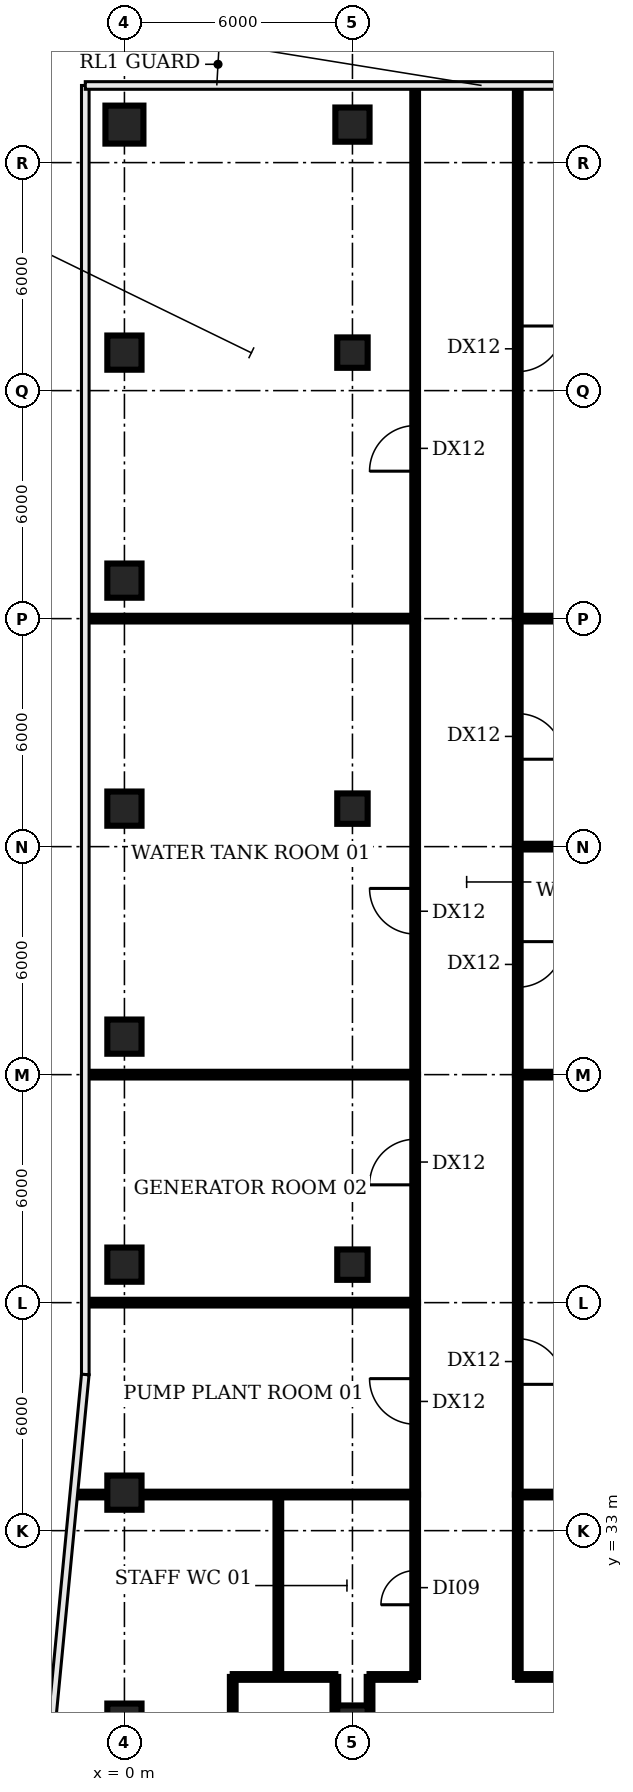
"""IFC4 building model, lengths in metres.
Left out: names, types, materials, properties, quantities, classifications, styles, units other than length and angle.
Written with IfcOpenShell. Run it as: python <this file> out.ifc"""

import sys

from ifc_helpers import new_model, si_unit, direction, frame, frame_2d, origin, origin_2d, place, context, subcontext, project, spatial, rectangle, circle, extrude, element, fill, save


model = new_model("IFC4")
c1 = context("Model", 3, precision=1e-05, world=origin(), true_north=direction((0.0, 1.0)))
c2 = subcontext(c1, "Body", "Model", "MODEL_VIEW")
j1 = project(units=[si_unit("LENGTHUNIT", "METRE"), si_unit("PLANEANGLEUNIT", "RADIAN")], contexts=[c1])
p1 = place(None, origin())
s1 = spatial("IfcSite", under=j1, at=p1, CompositionType="ELEMENT")
p2 = place(p1, origin())
s2 = spatial("IfcBuilding", under=s1, at=p2, CompositionType="ELEMENT")
p3 = place(p2, frame((0.0, 0.0, 251.6)))
s3 = spatial("IfcBuildingStorey", under=s2, at=p3, CompositionType="ELEMENT", Elevation=251.6)
for number, where, z_axis, x_axis in (
    (1, (0.0, 28.0, 0.0), (0.0, 0.0, 1.0), (1.0, 0.0, 0.0)),
    (2, (0.0, 34.0, 0.0), (0.0, 0.0, 1.0), (1.0, 0.0, 0.0)),
    (3, (0.0, 40.0, 0.0), (0.0, 0.0, 1.0), (1.0, 0.0, 0.0)),
    (4, (0.0, 46.0, 0.0), (0.0, 0.0, 1.0), (1.0, 0.0, 0.0)),
    (5, (0.0, 52.0, 0.0), (0.0, 0.0, 1.0), (1.0, 0.0, 0.0)),
    (6, (0.0, 58.0, 0.0), (0.0, 0.0, 1.0), (1.0, 0.0, 0.0)),
    (7, (0.0, 64.0, 0.0), (0.0, 0.0, 1.0), (1.0, 0.0, 0.0)),
):
    element("IfcColumn", number, at=place(p3, frame(where, z_axis=z_axis, x_axis=x_axis)), inside=s3, PredefinedType="COLUMN", context=c2, shape_type="SweptSolid", body=[
        extrude(rectangle(XDim=0.9, YDim=0.9, at=origin_2d()), origin(), (0.0, 0.0, 1.0), 3.2),
    ])
p4 = place(p3, frame((0.0, 70.0, 0.0), z_axis=(0.0, 0.0, 1.0), x_axis=(1.0, 0.0, 0.0)))
e8 = element("IfcColumn", 8, at=p4, inside=s3, PredefinedType="COLUMN", context=c2, shape_type="SweptSolid", body=[
    extrude(circle(Radius=0.5, at=origin_2d()), origin(), (0.0, 0.0, 1.0), 3.2),
])
for number, where, z_axis, x_axis in (
    (9, (6.0, 28.0, 0.0), (0.0, 0.0, 1.0), (1.0, 0.0, 0.0)),
    (10, (6.0, 40.0, 0.0), (0.0, 0.0, 1.0), (1.0, 0.0, 0.0)),
    (11, (6.0, 52.0, 0.0), (0.0, 0.0, 1.0), (1.0, 0.0, 0.0)),
    (12, (6.0, 64.0, 0.0), (0.0, 0.0, 1.0), (1.0, 0.0, 0.0)),
):
    element("IfcColumn", number, at=place(p3, frame(where, z_axis=z_axis, x_axis=x_axis)), inside=s3, PredefinedType="COLUMN", context=c2, shape_type="SweptSolid", body=[
        extrude(rectangle(XDim=0.8, YDim=0.8, at=origin_2d()), origin(), (0.0, 0.0, 1.0), 3.2),
    ])
p5 = place(p3, frame((6.0, 70.0, 0.0), z_axis=(0.0, 0.0, 1.0), x_axis=(1.0, 0.0, 0.0)))
e13 = element("IfcColumn", 13, at=p5, inside=s3, PredefinedType="COLUMN", context=c2, shape_type="SweptSolid", body=[
    extrude(rectangle(XDim=0.9, YDim=0.9, at=origin_2d()), origin(), (0.0, 0.0, 1.0), 3.2),
])
p6 = place(p3, frame((-1.28, 33.95, 0.0), z_axis=(0.0, 0.0, 1.0), x_axis=(1.0, 0.0, 0.0)))
e14 = element("IfcWall", 14, at=p6, inside=s3, PredefinedType="PARTITIONING", context=c2, shape_type="SweptSolid", body=[
    extrude(rectangle(XDim=8.93, YDim=0.15, at=frame_2d((4.465, 0.0))), origin(), (0.0, 0.0, 1.0), 2.83),
])
for number, where, z_axis, x_axis in (
    (15, (-0.98, 39.0, 0.0), (0.0, 0.0, 1.0), (1.0, 0.0, 0.0)),
    (16, (-0.98, 45.0, 0.0), (0.0, 0.0, 1.0), (1.0, 0.0, 0.0)),
    (17, (-0.98, 57.0, 0.0), (0.0, 0.0, 1.0), (1.0, 0.0, 0.0)),
):
    element("IfcWall", number, at=place(p3, frame(where, z_axis=z_axis, x_axis=x_axis)), inside=s3, PredefinedType="PARTITIONING", context=c2, shape_type="SweptSolid", body=[
        extrude(rectangle(XDim=8.63, YDim=0.15, at=frame_2d((4.315, 0.0))), origin(), (0.0, 0.0, 1.0), 2.83),
    ])
p7 = place(p3, frame((2.85, 27.95, 0.0), z_axis=(0.0, 0.0, 1.0), x_axis=(0.0, 1.0, 0.0)))
e18 = element("IfcWall", 18, at=p7, inside=s3, PredefinedType="PARTITIONING", context=c2, shape_type="SweptSolid", body=[
    extrude(rectangle(XDim=1.2, YDim=0.15, at=frame_2d((0.6, 0.0))), origin(), (0.0, 0.0, 1.0), 2.83),
])
p8 = place(p3, frame((2.85, 29.15, 0.0), z_axis=(0.0, 0.0, 1.0), x_axis=(1.0, 0.0, 0.0)))
e19 = element("IfcWall", 19, at=p8, inside=s3, PredefinedType="PARTITIONING", context=c2, shape_type="SweptSolid", body=[
    extrude(rectangle(XDim=2.7, YDim=0.15, at=frame_2d((1.35, 0.0))), origin(), (0.0, 0.0, 1.0), 2.83),
])
p9 = place(p3, frame((4.05, 29.15, 0.0), z_axis=(0.0, 0.0, 1.0), x_axis=(0.0, 1.0, 0.0)))
e20 = element("IfcWall", 20, at=p9, inside=s3, PredefinedType="PARTITIONING", context=c2, shape_type="SweptSolid", body=[
    extrude(rectangle(XDim=4.8, YDim=0.15, at=frame_2d((2.4, 0.0))), origin(), (0.0, 0.0, 1.0), 2.83),
])
for number, where, z_axis, x_axis in (
    (21, (5.55, 28.0, 0.0), (0.0, 0.0, 1.0), (0.0, 1.0, 0.0)),
    (22, (6.45, 28.0, 0.0), (0.0, 0.0, 1.0), (0.0, 1.0, 0.0)),
):
    element("IfcWall", number, at=place(p3, frame(where, z_axis=z_axis, x_axis=x_axis)), inside=s3, PredefinedType="PARTITIONING", context=c2, shape_type="SweptSolid", body=[
        extrude(rectangle(XDim=1.15, YDim=0.15, at=frame_2d((0.575, 0.0))), origin(), (0.0, 0.0, 1.0), 2.83),
    ])
p10 = place(p3, frame((6.45, 29.15, 0.0), z_axis=(0.0, 0.0, 1.0), x_axis=(1.0, 0.0, 0.0)))
e23 = element("IfcWall", 23, at=p10, inside=s3, PredefinedType="PARTITIONING", context=c2, shape_type="SweptSolid", body=[
    extrude(rectangle(XDim=1.2, YDim=0.15, at=frame_2d((0.6, 0.0))), origin(), (0.0, 0.0, 1.0), 2.83),
])
p11 = place(p3, frame((7.65, 29.15, 0.0), z_axis=(0.0, 0.0, 1.0), x_axis=(0.0, 1.0, 0.0)))
e24 = element("IfcWall", 24, at=p11, inside=s3, PredefinedType="PARTITIONING", context=c2, shape_type="SweptSolid", body=[
    extrude(rectangle(XDim=4.8, YDim=0.15, at=frame_2d((2.4, 0.0))), origin(), (0.0, 0.0, 1.0), 2.83),
])
p12 = place(p11, frame((1.9, 0.0, 0.0)))
e25 = element("IfcOpeningElement", 25, at=p12, cuts=e24, PredefinedType="OPENING", context=c2, shape_type="SweptSolid", body=[
    extrude(rectangle(XDim=0.9, YDim=2.1, at=frame_2d((0.45, 1.05))), frame((0.0, 0.085, 0.0), z_axis=(0.0, -1.0, 0.0), x_axis=(1.0, 0.0, 0.0)), (0.0, 0.0, 1.0), 0.17),
])
p13 = place(p3, frame((7.65, 33.95, 0.0), z_axis=(0.0, 0.0, 1.0), x_axis=(0.0, 1.0, 0.0)))
e26 = element("IfcWall", 26, at=p13, inside=s3, PredefinedType="PARTITIONING", context=c2, shape_type="SweptSolid", body=[
    extrude(rectangle(XDim=5.05, YDim=0.15, at=frame_2d((2.525, 0.0))), origin(), (0.0, 0.0, 1.0), 2.83),
])
p14 = place(p13, frame((1.85, 0.0, 0.0)))
e27 = element("IfcOpeningElement", 27, at=p14, cuts=e26, PredefinedType="OPENING", context=c2, shape_type="SweptSolid", body=[
    extrude(rectangle(XDim=1.2, YDim=2.1, at=frame_2d((0.6, 1.05))), frame((0.0, 0.085, 0.0), z_axis=(0.0, -1.0, 0.0), x_axis=(1.0, 0.0, 0.0)), (0.0, 0.0, 1.0), 0.17),
])
p15 = place(p3, frame((7.65, 39.0, 0.0), z_axis=(0.0, 0.0, 1.0), x_axis=(0.0, 1.0, 0.0)))
e28 = element("IfcWall", 28, at=p15, inside=s3, PredefinedType="PARTITIONING", context=c2, shape_type="SweptSolid", body=[
    extrude(rectangle(XDim=6.0, YDim=0.15, at=frame_2d((3.0, 0.0))), origin(), (0.0, 0.0, 1.0), 2.83),
])
p16 = place(p15, frame((3.1, 0.0, 0.0)))
e29 = element("IfcOpeningElement", 29, at=p16, cuts=e28, PredefinedType="OPENING", context=c2, shape_type="SweptSolid", body=[
    extrude(rectangle(XDim=1.2, YDim=2.1, at=frame_2d((0.6, 1.05))), frame((0.0, 0.085, 0.0), z_axis=(0.0, -1.0, 0.0), x_axis=(1.0, 0.0, 0.0)), (0.0, 0.0, 1.0), 0.17),
])
p17 = place(p3, frame((7.65, 45.0, 0.0), z_axis=(0.0, 0.0, 1.0), x_axis=(0.0, 1.0, 0.0)))
e30 = element("IfcWall", 30, at=p17, inside=s3, PredefinedType="PARTITIONING", context=c2, shape_type="SweptSolid", body=[
    extrude(rectangle(XDim=12.0, YDim=0.15, at=frame_2d((6.0, 0.0))), origin(), (0.0, 0.0, 1.0), 2.83),
])
p18 = place(p17, frame((3.7, 0.0, 0.0)))
e31 = element("IfcOpeningElement", 31, at=p18, cuts=e30, PredefinedType="OPENING", context=c2, shape_type="SweptSolid", body=[
    extrude(rectangle(XDim=1.2, YDim=2.1, at=frame_2d((0.6, 1.05))), frame((0.0, 0.085, 0.0), z_axis=(0.0, -1.0, 0.0), x_axis=(1.0, 0.0, 0.0)), (0.0, 0.0, 1.0), 0.17),
])
p19 = place(p3, frame((7.65, 57.0, 0.0), z_axis=(0.0, 0.0, 1.0), x_axis=(0.0, 1.0, 0.0)))
e32 = element("IfcWall", 32, at=p19, inside=s3, PredefinedType="PARTITIONING", context=c2, shape_type="SweptSolid", body=[
    extrude(rectangle(XDim=13.98, YDim=0.15, at=frame_2d((6.99, 0.0))), origin(), (0.0, 0.0, 1.0), 2.83),
])
p20 = place(p19, frame((3.88, 0.0, 0.0)))
e33 = element("IfcOpeningElement", 33, at=p20, cuts=e32, PredefinedType="OPENING", context=c2, shape_type="SweptSolid", body=[
    extrude(rectangle(XDim=1.2, YDim=2.1, at=frame_2d((0.6, 1.05))), frame((0.0, 0.085, 0.0), z_axis=(0.0, -1.0, 0.0), x_axis=(1.0, 0.0, 0.0)), (0.0, 0.0, 1.0), 0.17),
])
p21 = place(p3, frame((10.35, 29.15, 0.0), z_axis=(0.0, 0.0, 1.0), x_axis=(0.0, 1.0, 0.0)))
e34 = element("IfcWall", 34, at=p21, inside=s3, PredefinedType="PARTITIONING", context=c2, shape_type="SweptSolid", body=[
    extrude(rectangle(XDim=4.8, YDim=0.15, at=frame_2d((2.4, 0.0))), origin(), (0.0, 0.0, 1.0), 2.83),
])
p22 = place(p3, frame((10.35, 29.15, 0.0), z_axis=(0.0, 0.0, 1.0), x_axis=(1.0, 0.0, 0.0)))
e35 = element("IfcWall", 35, at=p22, inside=s3, PredefinedType="PARTITIONING", context=c2, shape_type="SweptSolid", body=[
    extrude(rectangle(XDim=1.25, YDim=0.15, at=frame_2d((0.625, 0.0))), origin(), (0.0, 0.0, 1.0), 2.83),
])
p23 = place(p3, frame((10.35, 33.95, 0.0), z_axis=(0.0, 0.0, 1.0), x_axis=(1.0, 0.0, 0.0)))
e36 = element("IfcWall", 36, at=p23, inside=s3, PredefinedType="PARTITIONING", context=c2, shape_type="SweptSolid", body=[
    extrude(rectangle(XDim=14.63, YDim=0.15, at=frame_2d((7.315, 0.0))), origin(), (0.0, 0.0, 1.0), 2.83),
])
p24 = place(p3, frame((10.35, 45.0, 0.0), z_axis=(0.0, 0.0, 1.0), x_axis=(0.0, -1.0, 0.0)))
e37 = element("IfcWall", 37, at=p24, inside=s3, PredefinedType="PARTITIONING", context=c2, shape_type="SweptSolid", body=[
    extrude(rectangle(XDim=11.05, YDim=0.15, at=frame_2d((5.525, 0.0))), origin(), (0.0, 0.0, 1.0), 2.83),
])
p25 = place(p24, frame((6.95, 0.0, 0.0)))
e38 = element("IfcOpeningElement", 38, at=p25, cuts=e37, PredefinedType="OPENING", context=c2, shape_type="SweptSolid", body=[
    extrude(rectangle(XDim=1.2, YDim=2.1, at=frame_2d((0.6, 1.05))), frame((0.0, 0.085, 0.0), z_axis=(0.0, -1.0, 0.0), x_axis=(1.0, 0.0, 0.0)), (0.0, 0.0, 1.0), 0.17),
])
p26 = place(p3, frame((10.35, 45.0, 0.0), z_axis=(0.0, 0.0, 1.0), x_axis=(1.0, 0.0, 0.0)))
e39 = element("IfcWall", 39, at=p26, inside=s3, PredefinedType="PARTITIONING", context=c2, shape_type="SweptSolid", body=[
    extrude(rectangle(XDim=15.51, YDim=0.15, at=frame_2d((7.755, 0.0))), origin(), (0.0, 0.0, 1.0), 2.83),
])
p27 = place(p3, frame((10.35, 51.0, 0.0), z_axis=(0.0, 0.0, 1.0), x_axis=(0.0, -1.0, 0.0)))
e40 = element("IfcWall", 40, at=p27, inside=s3, PredefinedType="PARTITIONING", context=c2, shape_type="SweptSolid", body=[
    extrude(rectangle(XDim=6.0, YDim=0.15, at=frame_2d((3.0, 0.0))), origin(), (0.0, 0.0, 1.0), 2.83),
])
p28 = place(p27, frame((2.5, 0.0, 0.0)))
e41 = element("IfcOpeningElement", 41, at=p28, cuts=e40, PredefinedType="OPENING", context=c2, shape_type="SweptSolid", body=[
    extrude(rectangle(XDim=1.2, YDim=2.1, at=frame_2d((0.6, 1.05))), frame((0.0, 0.085, 0.0), z_axis=(0.0, -1.0, 0.0), x_axis=(1.0, 0.0, 0.0)), (0.0, 0.0, 1.0), 0.17),
])
p29 = place(p3, frame((10.35, 51.0, 0.0), z_axis=(0.0, 0.0, 1.0), x_axis=(1.0, 0.0, 0.0)))
e42 = element("IfcWall", 42, at=p29, inside=s3, PredefinedType="PARTITIONING", context=c2, shape_type="SweptSolid", body=[
    extrude(rectangle(XDim=16.09, YDim=0.15, at=frame_2d((8.045, 0.0))), origin(), (0.0, 0.0, 1.0), 2.83),
])
p30 = place(p3, frame((10.35, 57.0, 0.0), z_axis=(0.0, 0.0, 1.0), x_axis=(0.0, -1.0, 0.0)))
e43 = element("IfcWall", 43, at=p30, inside=s3, PredefinedType="PARTITIONING", context=c2, shape_type="SweptSolid", body=[
    extrude(rectangle(XDim=6.0, YDim=0.15, at=frame_2d((3.0, 0.0))), origin(), (0.0, 0.0, 1.0), 2.83),
])
p31 = place(p30, frame((2.5, 0.0, 0.0)))
e44 = element("IfcOpeningElement", 44, at=p31, cuts=e43, PredefinedType="OPENING", context=c2, shape_type="SweptSolid", body=[
    extrude(rectangle(XDim=1.2, YDim=2.1, at=frame_2d((0.6, 1.05))), frame((0.0, 0.085, 0.0), z_axis=(0.0, -1.0, 0.0), x_axis=(1.0, 0.0, 0.0)), (0.0, 0.0, 1.0), 0.17),
])
p32 = place(p3, frame((10.35, 57.0, 0.0), z_axis=(0.0, 0.0, 1.0), x_axis=(1.0, 0.0, 0.0)))
e45 = element("IfcWall", 45, at=p32, inside=s3, PredefinedType="PARTITIONING", context=c2, shape_type="SweptSolid", body=[
    extrude(rectangle(XDim=16.67, YDim=0.15, at=frame_2d((8.335, 0.0))), origin(), (0.0, 0.0, 1.0), 2.83),
])
p33 = place(p3, frame((10.35, 70.98, 0.0), z_axis=(0.0, 0.0, 1.0), x_axis=(0.0, -1.0, 0.0)))
e46 = element("IfcWall", 46, at=p33, inside=s3, PredefinedType="PARTITIONING", context=c2, shape_type="SweptSolid", body=[
    extrude(rectangle(XDim=13.98, YDim=0.15, at=frame_2d((6.99, 0.0))), origin(), (0.0, 0.0, 1.0), 2.83),
])
p34 = place(p33, frame((6.28, 0.0, 0.0)))
e47 = element("IfcOpeningElement", 47, at=p34, cuts=e46, PredefinedType="OPENING", context=c2, shape_type="SweptSolid", body=[
    extrude(rectangle(XDim=1.2, YDim=2.1, at=frame_2d((0.6, 1.05))), frame((0.0, 0.085, 0.0), z_axis=(0.0, -1.0, 0.0), x_axis=(1.0, 0.0, 0.0)), (0.0, 0.0, 1.0), 0.17),
])
p35 = place(p12, origin())
e48 = element("IfcDoor", 48, at=p35, inside=s3, OperationType="SINGLE_SWING_LEFT", PredefinedType="DOOR", context=c2, shape_type="SweptSolid", body=[
    extrude(rectangle(XDim=0.9, YDim=2.1, at=frame_2d((0.45, 1.05))), frame((0.0, 0.025, 0.0), z_axis=(0.0, -1.0, 0.0), x_axis=(1.0, 0.0, 0.0)), (0.0, 0.0, 1.0), 0.05),
])
fill(e25, e48)
p36 = place(p14, origin())
e49 = element("IfcDoor", 49, at=p36, inside=s3, OperationType="SINGLE_SWING_RIGHT", PredefinedType="DOOR", context=c2, shape_type="SweptSolid", body=[
    extrude(rectangle(XDim=1.2, YDim=2.1, at=frame_2d((0.6, 1.05))), frame((0.0, 0.025, 0.0), z_axis=(0.0, -1.0, 0.0), x_axis=(1.0, 0.0, 0.0)), (0.0, 0.0, 1.0), 0.05),
])
fill(e27, e49)
p37 = place(p16, origin())
e50 = element("IfcDoor", 50, at=p37, inside=s3, OperationType="SINGLE_SWING_LEFT", PredefinedType="DOOR", context=c2, shape_type="SweptSolid", body=[
    extrude(rectangle(XDim=1.2, YDim=2.1, at=frame_2d((0.6, 1.05))), frame((0.0, 0.025, 0.0), z_axis=(0.0, -1.0, 0.0), x_axis=(1.0, 0.0, 0.0)), (0.0, 0.0, 1.0), 0.05),
])
fill(e29, e50)
p38 = place(p18, origin())
e51 = element("IfcDoor", 51, at=p38, inside=s3, OperationType="SINGLE_SWING_RIGHT", PredefinedType="DOOR", context=c2, shape_type="SweptSolid", body=[
    extrude(rectangle(XDim=1.2, YDim=2.1, at=frame_2d((0.6, 1.05))), frame((0.0, 0.025, 0.0), z_axis=(0.0, -1.0, 0.0), x_axis=(1.0, 0.0, 0.0)), (0.0, 0.0, 1.0), 0.05),
])
fill(e31, e51)
p39 = place(p20, origin())
e52 = element("IfcDoor", 52, at=p39, inside=s3, OperationType="SINGLE_SWING_LEFT", PredefinedType="DOOR", context=c2, shape_type="SweptSolid", body=[
    extrude(rectangle(XDim=1.2, YDim=2.1, at=frame_2d((0.6, 1.05))), frame((0.0, 0.025, 0.0), z_axis=(0.0, -1.0, 0.0), x_axis=(1.0, 0.0, 0.0)), (0.0, 0.0, 1.0), 0.05),
])
fill(e33, e52)
p40 = place(p25, origin())
e53 = element("IfcDoor", 53, at=p40, inside=s3, OperationType="SINGLE_SWING_RIGHT", PredefinedType="DOOR", context=c2, shape_type="SweptSolid", body=[
    extrude(rectangle(XDim=1.2, YDim=2.1, at=frame_2d((0.6, 1.05))), frame((0.0, 0.025, 0.0), z_axis=(0.0, -1.0, 0.0), x_axis=(1.0, 0.0, 0.0)), (0.0, 0.0, 1.0), 0.05),
])
fill(e38, e53)
p41 = place(p28, origin())
e54 = element("IfcDoor", 54, at=p41, inside=s3, OperationType="SINGLE_SWING_LEFT", PredefinedType="DOOR", context=c2, shape_type="SweptSolid", body=[
    extrude(rectangle(XDim=1.2, YDim=2.1, at=frame_2d((0.6, 1.05))), frame((0.0, 0.025, 0.0), z_axis=(0.0, -1.0, 0.0), x_axis=(1.0, 0.0, 0.0)), (0.0, 0.0, 1.0), 0.05),
])
fill(e41, e54)
p42 = place(p31, origin())
e55 = element("IfcDoor", 55, at=p42, inside=s3, OperationType="SINGLE_SWING_RIGHT", PredefinedType="DOOR", context=c2, shape_type="SweptSolid", body=[
    extrude(rectangle(XDim=1.2, YDim=2.1, at=frame_2d((0.6, 1.05))), frame((0.0, 0.025, 0.0), z_axis=(0.0, -1.0, 0.0), x_axis=(1.0, 0.0, 0.0)), (0.0, 0.0, 1.0), 0.05),
])
fill(e44, e55)
p43 = place(p34, origin())
e56 = element("IfcDoor", 56, at=p43, inside=s3, OperationType="SINGLE_SWING_LEFT", PredefinedType="DOOR", context=c2, shape_type="SweptSolid", body=[
    extrude(rectangle(XDim=1.2, YDim=2.1, at=frame_2d((0.6, 1.05))), frame((0.0, 0.025, 0.0), z_axis=(0.0, -1.0, 0.0), x_axis=(1.0, 0.0, 0.0)), (0.0, 0.0, 1.0), 0.05),
])
fill(e47, e56)
save(model, sys.argv[1])
